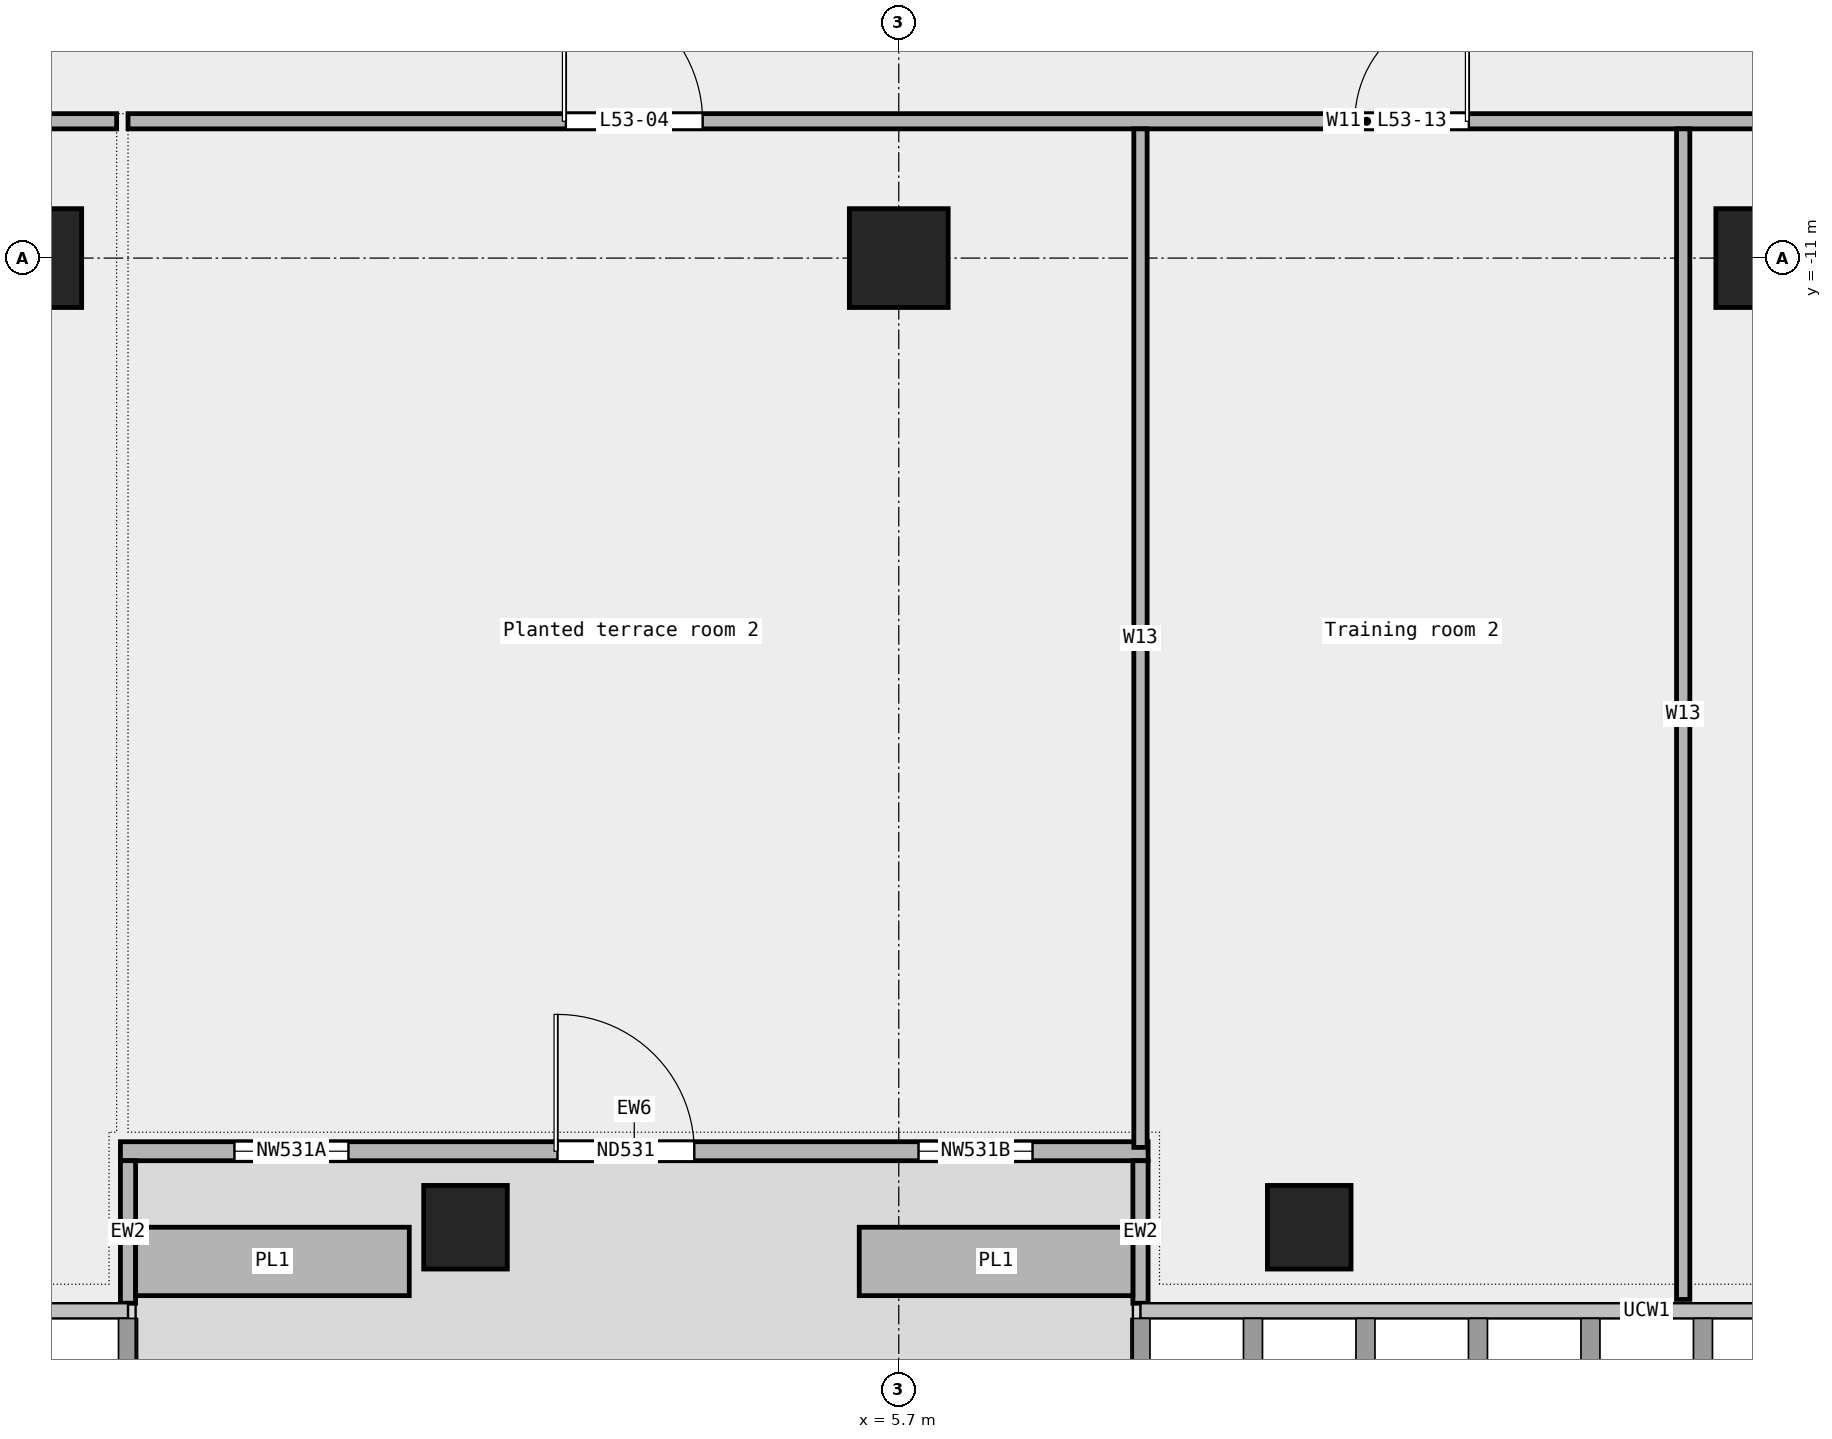
"""IFC4 building model, lengths in metres.
Left out: names, types, materials, properties, quantities, classifications, styles, units other than length and angle.
Written with IfcOpenShell. Run it as: python <this file> out.ifc"""

import sys

from ifc_helpers import new_model, si_unit, direction, frame, frame_2d, origin, origin_2d, place, context, subcontext, project, spatial, rectangle, extrude, element, fill, save


model = new_model("IFC4")
c1 = context("Model", 3, precision=1e-05, world=origin(), true_north=direction((0.0, 1.0)))
c2 = subcontext(c1, "Body", "Model", "MODEL_VIEW")
j1 = project(units=[si_unit("LENGTHUNIT", "METRE"), si_unit("PLANEANGLEUNIT", "RADIAN")], contexts=[c1])
p1 = place(None, origin())
s1 = spatial("IfcSite", under=j1, at=p1, CompositionType="ELEMENT")
p2 = place(p1, origin())
s2 = spatial("IfcBuilding", under=s1, at=p2, CompositionType="ELEMENT")
p3 = place(p2, frame((0.0, 0.0, 247.0)))
s3 = spatial("IfcBuildingStorey", under=s2, at=p3, CompositionType="ELEMENT", Elevation=247.0)
for number, where, z_axis, x_axis in (
    (1, (0.0, -23.75, 0.0), (0.0, 0.0, 1.0), (1.0, 0.0, 0.0)),
    (2, (11.1, -23.75, 0.0), (0.0, 0.0, 1.0), (1.0, 0.0, 0.0)),
):
    element("IfcColumn", number, at=place(p3, frame(where, z_axis=z_axis, x_axis=x_axis)), inside=s3, PredefinedType="COLUMN", context=c2, shape_type="SweptSolid", body=[
        extrude(rectangle(XDim=1.1, YDim=1.1, at=origin_2d()), origin(), (0.0, 0.0, 1.0), 3.6),
    ])
for number, where, z_axis, x_axis in (
    (3, (-5.7, -11.0, 0.0), (0.0, 0.0, 1.0), (1.0, 0.0, 0.0)),
    (4, (5.7, -11.0, 0.0), (0.0, 0.0, 1.0), (1.0, 0.0, 0.0)),
    (5, (17.1, -11.0, 0.0), (0.0, 0.0, 1.0), (1.0, 0.0, 0.0)),
):
    element("IfcColumn", number, at=place(p3, frame(where, z_axis=z_axis, x_axis=x_axis)), inside=s3, PredefinedType="COLUMN", context=c2, shape_type="SweptSolid", body=[
        extrude(rectangle(XDim=1.3, YDim=1.3, at=origin_2d()), origin(), (0.0, 0.0, 1.0), 3.6),
    ])
p4 = place(p3, frame((-4.54, -22.75, 0.0), z_axis=(0.0, 0.0, 1.0), x_axis=(1.0, 0.0, 0.0)))
e6 = element("IfcWall", 6, at=p4, inside=s3, PredefinedType="STANDARD", context=c2, shape_type="SweptSolid", body=[
    extrude(rectangle(XDim=13.52, YDim=0.25, at=frame_2d((6.76, 0.0))), origin(), (0.0, 0.0, 1.0), 3.6),
])
p5 = place(p4, frame((1.5, 0.0, 0.45)))
e7 = element("IfcOpeningElement", 7, at=p5, cuts=e6, PredefinedType="OPENING", context=c2, shape_type="SweptSolid", body=[
    extrude(rectangle(XDim=1.5, YDim=2.4, at=frame_2d((0.75, 1.2))), frame((0.0, 0.137, 0.0), z_axis=(0.0, -1.0, 0.0), x_axis=(1.0, 0.0, 0.0)), (0.0, 0.0, 1.0), 0.274),
])
p6 = place(p4, frame((5.75, 0.0, 0.0)))
e8 = element("IfcOpeningElement", 8, at=p6, cuts=e6, PredefinedType="OPENING", context=c2, shape_type="SweptSolid", body=[
    extrude(rectangle(XDim=1.8, YDim=2.4, at=frame_2d((0.9, 1.2))), frame((0.0, 0.137, 0.0), z_axis=(0.0, -1.0, 0.0), x_axis=(1.0, 0.0, 0.0)), (0.0, 0.0, 1.0), 0.274),
])
p7 = place(p4, frame((10.5, 0.0, 0.45)))
e9 = element("IfcOpeningElement", 9, at=p7, cuts=e6, PredefinedType="OPENING", context=c2, shape_type="SweptSolid", body=[
    extrude(rectangle(XDim=1.5, YDim=2.4, at=frame_2d((0.75, 1.2))), frame((0.0, 0.137, 0.0), z_axis=(0.0, -1.0, 0.0), x_axis=(1.0, 0.0, 0.0)), (0.0, 0.0, 1.0), 0.274),
])
for number, where, z_axis, x_axis in (
    (10, (-4.44, -24.75, 0.0), (0.0, 0.0, 1.0), (0.0, 1.0, 0.0)),
    (11, (8.88, -24.75, 0.0), (0.0, 0.0, 1.0), (0.0, 1.0, 0.0)),
):
    element("IfcWall", number, at=place(p3, frame(where, z_axis=z_axis, x_axis=x_axis)), inside=s3, PredefinedType="STANDARD", context=c2, shape_type="SweptSolid", body=[
        extrude(rectangle(XDim=1.875, YDim=0.2, at=frame_2d((0.938, 0.0))), origin(), (0.0, 0.0, 1.0), 3.6),
    ])
for number, where, z_axis, x_axis in (
    (12, (-4.34, -24.2, 0.0), (0.0, 0.0, 1.0), (1.0, 0.0, 0.0)),
    (13, (5.18, -24.2, 0.0), (0.0, 0.0, 1.0), (1.0, 0.0, 0.0)),
):
    element("IfcWall", number, at=place(p3, frame(where, z_axis=z_axis, x_axis=x_axis)), inside=s3, PredefinedType="STANDARD", context=c2, shape_type="SweptSolid", body=[
        extrude(rectangle(XDim=3.6, YDim=0.9, at=frame_2d((1.8, 0.0))), origin(), (0.0, 0.0, 1.0), 0.7),
    ])
p8 = place(p3, frame((-28.15, -9.2, 0.0), z_axis=(0.0, 0.0, 1.0), x_axis=(1.0, 0.0, 0.0)))
e14 = element("IfcWall", 14, at=p8, inside=s3, PredefinedType="PARTITIONING", context=c2, shape_type="SweptSolid", body=[
    extrude(rectangle(XDim=23.56, YDim=0.2, at=frame_2d((11.78, 0.0))), origin(), (0.0, 0.0, 1.0), 3.6),
])
p9 = place(p8, frame((11.88, 0.0, 0.0)))
e15 = element("IfcOpeningElement", 15, at=p9, cuts=e14, PredefinedType="OPENING", context=c2, shape_type="SweptSolid", body=[
    extrude(rectangle(XDim=1.8, YDim=2.1, at=frame_2d((0.9, 1.05))), frame((0.0, 0.112, 0.0), z_axis=(0.0, -1.0, 0.0), x_axis=(1.0, 0.0, 0.0)), (0.0, 0.0, 1.0), 0.224),
])
p10 = place(p3, frame((-4.44, -9.2, 0.0), z_axis=(0.0, 0.0, 1.0), x_axis=(1.0, 0.0, 0.0)))
e16 = element("IfcWall", 16, at=p10, inside=s3, PredefinedType="PARTITIONING", context=c2, shape_type="SweptSolid", body=[
    extrude(rectangle(XDim=32.59, YDim=0.2, at=frame_2d((16.295, 0.0))), origin(), (0.0, 0.0, 1.0), 3.6),
])
p11 = place(p10, frame((25.525, 0.0, 0.0)))
e17 = element("IfcOpeningElement", 17, at=p11, cuts=e16, PredefinedType="OPENING", context=c2, shape_type="SweptSolid", body=[
    extrude(rectangle(XDim=1.8, YDim=2.1, at=frame_2d((0.9, 1.05))), frame((0.0, 0.112, 0.0), z_axis=(0.0, -1.0, 0.0), x_axis=(1.0, 0.0, 0.0)), (0.0, 0.0, 1.0), 0.224),
])
p12 = place(p10, frame((5.76, 0.0, 0.0)))
e18 = element("IfcOpeningElement", 18, at=p12, cuts=e16, PredefinedType="OPENING", context=c2, shape_type="SweptSolid", body=[
    extrude(rectangle(XDim=1.8, YDim=2.1, at=frame_2d((0.9, 1.05))), frame((0.0, 0.112, 0.0), z_axis=(0.0, -1.0, 0.0), x_axis=(1.0, 0.0, 0.0)), (0.0, 0.0, 1.0), 0.224),
])
p13 = place(p10, frame((16.14, 0.0, 0.0)))
e19 = element("IfcOpeningElement", 19, at=p13, cuts=e16, PredefinedType="OPENING", context=c2, shape_type="SweptSolid", body=[
    extrude(rectangle(XDim=1.5, YDim=2.1, at=frame_2d((0.75, 1.05))), frame((0.0, 0.112, 0.0), z_axis=(0.0, -1.0, 0.0), x_axis=(1.0, 0.0, 0.0)), (0.0, 0.0, 1.0), 0.224),
])
p14 = place(p3, frame((8.88, -22.7, 0.0), z_axis=(0.0, 0.0, 1.0), x_axis=(0.0, 1.0, 0.0)))
e20 = element("IfcWall", 20, at=p14, inside=s3, PredefinedType="PARTITIONING", context=c2, shape_type="SweptSolid", body=[
    extrude(rectangle(XDim=13.4, YDim=0.175, at=frame_2d((6.7, 0.0))), origin(), (0.0, 0.0, 1.0), 3.6),
])
p15 = place(p3, frame((16.02, -24.7, 0.0), z_axis=(0.0, 0.0, 1.0), x_axis=(0.0, 1.0, 0.0)))
e21 = element("IfcWall", 21, at=p15, inside=s3, PredefinedType="PARTITIONING", context=c2, shape_type="SweptSolid", body=[
    extrude(rectangle(XDim=15.4, YDim=0.175, at=frame_2d((7.7, 0.0))), origin(), (0.0, 0.0, 1.0), 3.6),
])
p16 = place(p5, origin())
e22 = element("IfcWindow", 22, at=p16, inside=s3, PartitioningType="SINGLE_PANEL", PredefinedType="WINDOW", context=c2, shape_type="SweptSolid", body=[
    extrude(rectangle(XDim=1.5, YDim=2.4, at=frame_2d((0.75, 1.2))), frame((0.0, 0.03, 0.0), z_axis=(0.0, -1.0, 0.0), x_axis=(1.0, 0.0, 0.0)), (0.0, 0.0, 1.0), 0.06),
])
fill(e7, e22)
p17 = place(p6, origin())
e23 = element("IfcDoor", 23, at=p17, inside=s3, OperationType="DOUBLE_DOOR_SINGLE_SWING", PredefinedType="DOOR", context=c2, shape_type="SweptSolid", body=[
    extrude(rectangle(XDim=1.8, YDim=2.4, at=frame_2d((0.9, 1.2))), frame((0.0, 0.025, 0.0), z_axis=(0.0, -1.0, 0.0), x_axis=(1.0, 0.0, 0.0)), (0.0, 0.0, 1.0), 0.05),
])
fill(e8, e23)
p18 = place(p7, origin())
e24 = element("IfcWindow", 24, at=p18, inside=s3, PartitioningType="SINGLE_PANEL", PredefinedType="WINDOW", context=c2, shape_type="SweptSolid", body=[
    extrude(rectangle(XDim=1.5, YDim=2.4, at=frame_2d((0.75, 1.2))), frame((0.0, 0.03, 0.0), z_axis=(0.0, -1.0, 0.0), x_axis=(1.0, 0.0, 0.0)), (0.0, 0.0, 1.0), 0.06),
])
fill(e9, e24)
p19 = place(p12, origin())
e25 = element("IfcDoor", 25, at=p19, inside=s3, OperationType="DOUBLE_DOOR_SINGLE_SWING", PredefinedType="DOOR", context=c2, shape_type="SweptSolid", body=[
    extrude(rectangle(XDim=1.8, YDim=2.1, at=frame_2d((0.9, 1.05))), frame((0.0, 0.025, 0.0), z_axis=(0.0, -1.0, 0.0), x_axis=(1.0, 0.0, 0.0)), (0.0, 0.0, 1.0), 0.05),
])
fill(e18, e25)
p20 = place(p13, origin())
e26 = element("IfcDoor", 26, at=p20, inside=s3, OperationType="DOUBLE_DOOR_SINGLE_SWING", PredefinedType="DOOR", context=c2, shape_type="SweptSolid", body=[
    extrude(rectangle(XDim=1.5, YDim=2.1, at=frame_2d((0.75, 1.05))), frame((0.0, 0.025, 0.0), z_axis=(0.0, -1.0, 0.0), x_axis=(1.0, 0.0, 0.0)), (0.0, 0.0, 1.0), 0.05),
])
fill(e19, e26)
save(model, sys.argv[1])
